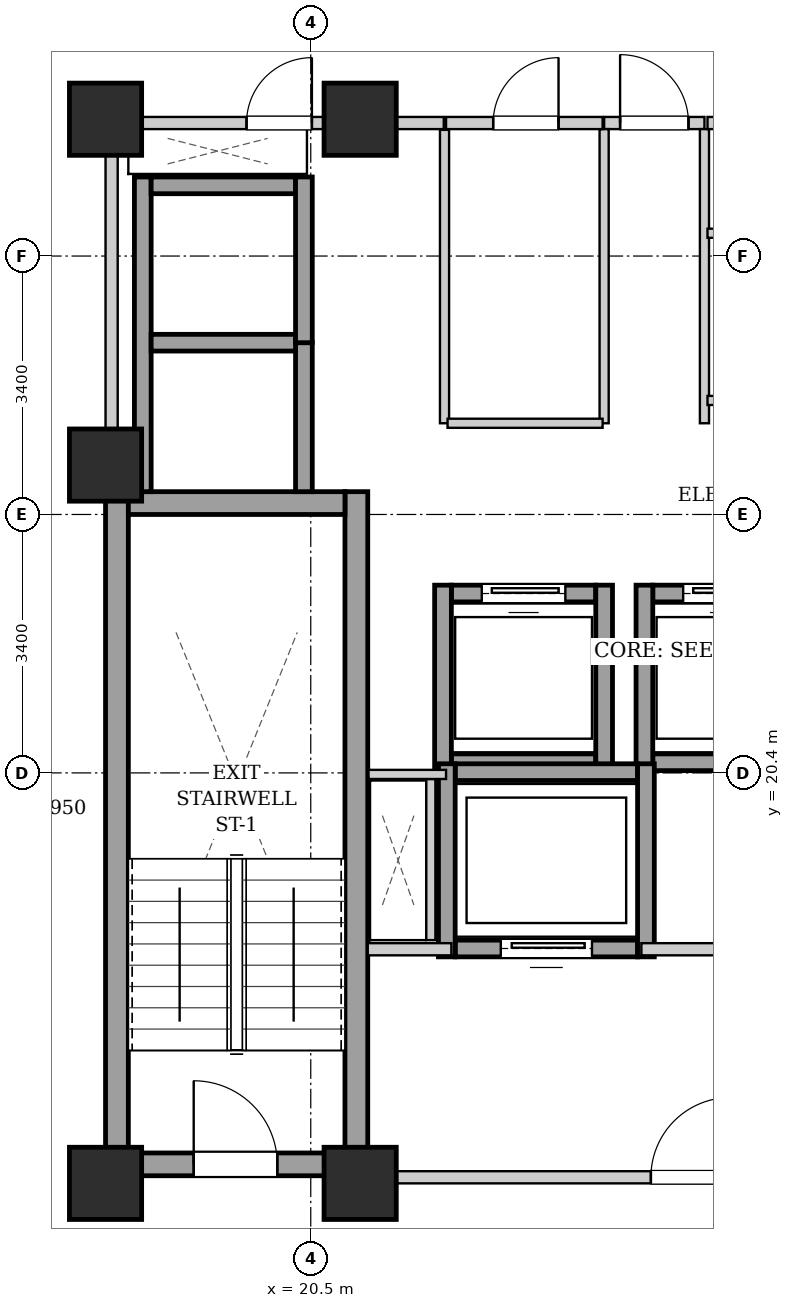
"""IFC4 building model, lengths in metres.
Left out: names, types, materials, properties, quantities, classifications, styles, units other than length and angle.
Written with IfcOpenShell. Run it as: python <this file> out.ifc"""

import sys

from ifc_helpers import new_model, si_unit, direction, frame, frame_2d, origin, origin_2d, place, context, subcontext, project, spatial, rectangle, extrude, element, fill, save


model = new_model("IFC4")
c1 = context("Model", 3, precision=1e-05, world=origin(), true_north=direction((0.0, 1.0)))
c2 = subcontext(c1, "Body", "Model", "MODEL_VIEW")
j1 = project(units=[si_unit("LENGTHUNIT", "METRE"), si_unit("PLANEANGLEUNIT", "RADIAN")], contexts=[c1])
p1 = place(None, origin())
s1 = spatial("IfcSite", under=j1, at=p1, CompositionType="ELEMENT")
p2 = place(p1, origin())
s2 = spatial("IfcBuilding", under=s1, at=p2, CompositionType="ELEMENT")
p3 = place(p2, frame((0.0, 0.0, 137.4)))
s3 = spatial("IfcBuildingStorey", under=s2, at=p3, CompositionType="ELEMENT", Elevation=137.4)
for number, where, z_axis, x_axis in (
    (1, (17.8, 15.0, 0.0), (0.0, 0.0, 1.0), (1.0, 0.0, 0.0)),
    (2, (21.15, 15.0, 0.0), (0.0, 0.0, 1.0), (1.0, 0.0, 0.0)),
    (3, (17.8, 29.0, 0.0), (0.0, 0.0, 1.0), (1.0, 0.0, 0.0)),
    (4, (21.15, 29.0, 0.0), (0.0, 0.0, 1.0), (1.0, 0.0, 0.0)),
    (5, (17.8, 24.45, 0.0), (0.0, 0.0, 1.0), (1.0, 0.0, 0.0)),
):
    element("IfcColumn", number, at=place(p3, frame(where, z_axis=z_axis, x_axis=x_axis)), inside=s3, PredefinedType="COLUMN", context=c2, shape_type="SweptSolid", body=[
        extrude(rectangle(XDim=0.95, YDim=0.95, at=origin_2d()), origin(), (0.0, 0.0, 1.0), 3.25),
    ])
for number, where, z_axis, x_axis in (
    (6, (17.95, 15.1, 0.0), (0.0, 0.0, 1.0), (0.0, 1.0, 0.0)),
    (7, (21.1, 15.1, 0.0), (0.0, 0.0, 1.0), (0.0, 1.0, 0.0)),
):
    element("IfcWall", number, at=place(p3, frame(where, z_axis=z_axis, x_axis=x_axis)), inside=s3, PredefinedType="SHEAR", context=c2, shape_type="SweptSolid", body=[
        extrude(rectangle(XDim=9.0, YDim=0.3, at=frame_2d((4.5, 0.0))), origin(), (0.0, 0.0, 1.0), 2.99),
    ])
p4 = place(p3, frame((18.1, 23.95, 0.0), z_axis=(0.0, 0.0, 1.0), x_axis=(1.0, 0.0, 0.0)))
e8 = element("IfcWall", 8, at=p4, inside=s3, PredefinedType="SHEAR", context=c2, shape_type="SweptSolid", body=[
    extrude(rectangle(XDim=2.85, YDim=0.3, at=frame_2d((1.425, 0.0))), origin(), (0.0, 0.0, 1.0), 2.99),
])
p5 = place(p3, frame((18.1, 15.25, 0.0), z_axis=(0.0, 0.0, 1.0), x_axis=(1.0, 0.0, 0.0)))
e9 = element("IfcWall", 9, at=p5, inside=s3, PredefinedType="SHEAR", context=c2, shape_type="SweptSolid", body=[
    extrude(rectangle(XDim=2.85, YDim=0.3, at=frame_2d((1.425, 0.0))), origin(), (0.0, 0.0, 1.0), 2.99),
])
p6 = place(p5, frame((0.86, 0.0, 0.0)))
e10 = element("IfcOpeningElement", 10, at=p6, cuts=e9, PredefinedType="OPENING", context=c2, shape_type="SweptSolid", body=[
    extrude(rectangle(XDim=1.1, YDim=2.05, at=frame_2d((0.55, 1.025))), frame((0.0, 0.16, 0.0), z_axis=(0.0, -1.0, 0.0), x_axis=(1.0, 0.0, 0.0)), (0.0, 0.0, 1.0), 0.32),
])
p7 = place(p3, frame((22.35, 20.54, 0.0), z_axis=(0.0, 0.0, 1.0), x_axis=(1.0, 0.0, 0.0)))
e11 = element("IfcWall", 11, at=p7, inside=s3, PredefinedType="SHEAR", context=c2, shape_type="SweptSolid", body=[
    extrude(rectangle(XDim=1.9, YDim=0.22, at=frame_2d((0.95, 0.0))), origin(), (0.0, 0.0, 1.0), 2.99),
])
p8 = place(p3, frame((22.35, 22.76, 0.0), z_axis=(0.0, 0.0, 1.0), x_axis=(1.0, 0.0, 0.0)))
e12 = element("IfcWall", 12, at=p8, inside=s3, PredefinedType="SHEAR", context=c2, shape_type="SweptSolid", body=[
    extrude(rectangle(XDim=1.9, YDim=0.22, at=frame_2d((0.95, 0.0))), origin(), (0.0, 0.0, 1.0), 2.99),
])
p9 = place(p8, frame((0.4, 0.0, 0.0)))
e13 = element("IfcOpeningElement", 13, at=p9, cuts=e12, PredefinedType="OPENING", context=c2, shape_type="SweptSolid", body=[
    extrude(rectangle(XDim=1.1, YDim=2.15, at=frame_2d((0.55, 1.075))), frame((0.0, 0.12, 0.0), z_axis=(0.0, -1.0, 0.0), x_axis=(1.0, 0.0, 0.0)), (0.0, 0.0, 1.0), 0.24),
])
for number, where, z_axis, x_axis in (
    (14, (22.24, 20.43, 0.0), (0.0, 0.0, 1.0), (0.0, 1.0, 0.0)),
    (15, (24.36, 20.43, 0.0), (0.0, 0.0, 1.0), (0.0, 1.0, 0.0)),
):
    element("IfcWall", number, at=place(p3, frame(where, z_axis=z_axis, x_axis=x_axis)), inside=s3, PredefinedType="SHEAR", context=c2, shape_type="SweptSolid", body=[
        extrude(rectangle(XDim=2.44, YDim=0.22, at=frame_2d((1.22, 0.0))), origin(), (0.0, 0.0, 1.0), 2.99),
    ])
p10 = place(p3, frame((25.0, 20.54, 0.0), z_axis=(0.0, 0.0, 1.0), x_axis=(1.0, 0.0, 0.0)))
e16 = element("IfcWall", 16, at=p10, inside=s3, PredefinedType="SHEAR", context=c2, shape_type="SweptSolid", body=[
    extrude(rectangle(XDim=1.9, YDim=0.22, at=frame_2d((0.95, 0.0))), origin(), (0.0, 0.0, 1.0), 2.99),
])
p11 = place(p3, frame((25.0, 22.76, 0.0), z_axis=(0.0, 0.0, 1.0), x_axis=(1.0, 0.0, 0.0)))
e17 = element("IfcWall", 17, at=p11, inside=s3, PredefinedType="SHEAR", context=c2, shape_type="SweptSolid", body=[
    extrude(rectangle(XDim=1.9, YDim=0.22, at=frame_2d((0.95, 0.0))), origin(), (0.0, 0.0, 1.0), 2.99),
])
p12 = place(p11, frame((0.4, 0.0, 0.0)))
e18 = element("IfcOpeningElement", 18, at=p12, cuts=e17, PredefinedType="OPENING", context=c2, shape_type="SweptSolid", body=[
    extrude(rectangle(XDim=1.1, YDim=2.15, at=frame_2d((0.55, 1.075))), frame((0.0, 0.12, 0.0), z_axis=(0.0, -1.0, 0.0), x_axis=(1.0, 0.0, 0.0)), (0.0, 0.0, 1.0), 0.24),
])
p13 = place(p3, frame((24.89, 20.43, 0.0), z_axis=(0.0, 0.0, 1.0), x_axis=(0.0, 1.0, 0.0)))
e19 = element("IfcWall", 19, at=p13, inside=s3, PredefinedType="SHEAR", context=c2, shape_type="SweptSolid", body=[
    extrude(rectangle(XDim=2.44, YDim=0.22, at=frame_2d((1.22, 0.0))), origin(), (0.0, 0.0, 1.0), 2.99),
])
p14 = place(p3, frame((18.29, 24.1, 0.0), z_axis=(0.0, 0.0, 1.0), x_axis=(0.0, 1.0, 0.0)))
e20 = element("IfcWall", 20, at=p14, inside=s3, PredefinedType="SHEAR", context=c2, shape_type="SweptSolid", body=[
    extrude(rectangle(XDim=4.14, YDim=0.22, at=frame_2d((2.07, 0.0))), origin(), (0.0, 0.0, 1.0), 2.99),
])
p15 = place(p3, frame((20.41, 24.1, 0.0), z_axis=(0.0, 0.0, 1.0), x_axis=(0.0, 1.0, 0.0)))
e21 = element("IfcWall", 21, at=p15, inside=s3, PredefinedType="SHEAR", context=c2, shape_type="SweptSolid", body=[
    extrude(rectangle(XDim=1.96, YDim=0.22, at=frame_2d((0.98, 0.0))), origin(), (0.0, 0.0, 1.0), 2.99),
])
for number, where, z_axis, x_axis in (
    (22, (18.4, 26.06, 0.0), (0.0, 0.0, 1.0), (1.0, 0.0, 0.0)),
    (23, (18.4, 28.13, 0.0), (0.0, 0.0, 1.0), (1.0, 0.0, 0.0)),
):
    element("IfcWall", number, at=place(p3, frame(where, z_axis=z_axis, x_axis=x_axis)), inside=s3, PredefinedType="SHEAR", context=c2, shape_type="SweptSolid", body=[
        extrude(rectangle(XDim=1.9, YDim=0.22, at=frame_2d((0.95, 0.0))), origin(), (0.0, 0.0, 1.0), 2.99),
    ])
p16 = place(p3, frame((20.41, 26.06, 0.0), z_axis=(0.0, 0.0, 1.0), x_axis=(0.0, 1.0, 0.0)))
e24 = element("IfcWall", 24, at=p16, inside=s3, PredefinedType="SHEAR", context=c2, shape_type="SweptSolid", body=[
    extrude(rectangle(XDim=2.18, YDim=0.22, at=frame_2d((1.09, 0.0))), origin(), (0.0, 0.0, 1.0), 2.99),
])
p17 = place(p3, frame((22.4, 18.09, 0.0), z_axis=(0.0, 0.0, 1.0), x_axis=(1.0, 0.0, 0.0)))
e25 = element("IfcWall", 25, at=p17, inside=s3, PredefinedType="SHEAR", context=c2, shape_type="SweptSolid", body=[
    extrude(rectangle(XDim=2.4, YDim=0.22, at=frame_2d((1.2, 0.0))), origin(), (0.0, 0.0, 1.0), 2.99),
])
p18 = place(p17, frame((0.6, 0.0, 0.0)))
e26 = element("IfcOpeningElement", 26, at=p18, cuts=e25, PredefinedType="OPENING", context=c2, shape_type="SweptSolid", body=[
    extrude(rectangle(XDim=1.2, YDim=2.15, at=frame_2d((0.6, 1.075))), frame((0.0, 0.12, 0.0), z_axis=(0.0, -1.0, 0.0), x_axis=(1.0, 0.0, 0.0)), (0.0, 0.0, 1.0), 0.24),
])
p19 = place(p3, frame((22.4, 20.41, 0.0), z_axis=(0.0, 0.0, 1.0), x_axis=(1.0, 0.0, 0.0)))
e27 = element("IfcWall", 27, at=p19, inside=s3, PredefinedType="SHEAR", context=c2, shape_type="SweptSolid", body=[
    extrude(rectangle(XDim=2.4, YDim=0.22, at=frame_2d((1.2, 0.0))), origin(), (0.0, 0.0, 1.0), 2.99),
])
for number, where, z_axis, x_axis in (
    (28, (22.29, 17.98, 0.0), (0.0, 0.0, 1.0), (0.0, 1.0, 0.0)),
    (29, (24.91, 17.98, 0.0), (0.0, 0.0, 1.0), (0.0, 1.0, 0.0)),
):
    element("IfcWall", number, at=place(p3, frame(where, z_axis=z_axis, x_axis=x_axis)), inside=s3, PredefinedType="SHEAR", context=c2, shape_type="SweptSolid", body=[
        extrude(rectangle(XDim=2.54, YDim=0.22, at=frame_2d((1.27, 0.0))), origin(), (0.0, 0.0, 1.0), 2.99),
    ])
p20 = place(p3, frame((21.25, 15.08, 0.0), z_axis=(0.0, 0.0, 1.0), x_axis=(1.0, 0.0, 0.0)))
e30 = element("IfcWall", 30, at=p20, inside=s3, PredefinedType="PARTITIONING", context=c2, shape_type="SweptSolid", body=[
    extrude(rectangle(XDim=8.5, YDim=0.16, at=frame_2d((4.25, 0.0))), origin(), (0.0, 0.0, 1.0), 2.426),
])
p21 = place(p20, frame((3.725, 0.0, 0.0)))
e31 = element("IfcOpeningElement", 31, at=p21, cuts=e30, PredefinedType="OPENING", context=c2, shape_type="SweptSolid", body=[
    extrude(rectangle(XDim=1.05, YDim=2.05, at=frame_2d((0.525, 1.025))), frame((0.0, 0.09, 0.0), z_axis=(0.0, -1.0, 0.0), x_axis=(1.0, 0.0, 0.0)), (0.0, 0.0, 1.0), 0.18),
])
p22 = place(p3, frame((21.25, 18.08, 0.0), z_axis=(0.0, 0.0, 1.0), x_axis=(1.0, 0.0, 0.0)))
e32 = element("IfcWall", 32, at=p22, inside=s3, PredefinedType="PARTITIONING", context=c2, shape_type="SweptSolid", body=[
    extrude(rectangle(XDim=1.1, YDim=0.16, at=frame_2d((0.55, 0.0))), origin(), (0.0, 0.0, 1.0), 2.99),
])
p23 = place(p3, frame((24.85, 18.08, 0.0), z_axis=(0.0, 0.0, 1.0), x_axis=(1.0, 0.0, 0.0)))
e33 = element("IfcWall", 33, at=p23, inside=s3, PredefinedType="PARTITIONING", context=c2, shape_type="SweptSolid", body=[
    extrude(rectangle(XDim=1.3, YDim=0.16, at=frame_2d((0.65, 0.0))), origin(), (0.0, 0.0, 1.0), 2.99),
])
p24 = place(p3, frame((17.88, 24.12, 0.0), z_axis=(0.0, 0.0, 1.0), x_axis=(0.0, 1.0, 0.0)))
e34 = element("IfcWall", 34, at=p24, inside=s3, PredefinedType="PARTITIONING", context=c2, shape_type="SweptSolid", body=[
    extrude(rectangle(XDim=4.76, YDim=0.16, at=frame_2d((2.38, 0.0))), origin(), (0.0, 0.0, 1.0), 2.325),
])
p25 = place(p3, frame((24.36, 28.95, 0.0), z_axis=(0.0, 0.0, 1.0), x_axis=(1.0, 0.0, 0.0)))
e35 = element("IfcWall", 35, at=p25, inside=s3, PredefinedType="PARTITIONING", context=c2, shape_type="SweptSolid", body=[
    extrude(rectangle(XDim=1.32, YDim=0.16, at=frame_2d((0.66, 0.0))), origin(), (0.0, 0.0, 1.0), 2.426),
])
p26 = place(p25, frame((0.21, 0.0, 0.0)))
e36 = element("IfcOpeningElement", 36, at=p26, cuts=e35, PredefinedType="OPENING", context=c2, shape_type="SweptSolid", body=[
    extrude(rectangle(XDim=0.9, YDim=2.05, at=frame_2d((0.45, 1.025))), frame((0.0, 0.09, 0.0), z_axis=(0.0, -1.0, 0.0), x_axis=(1.0, 0.0, 0.0)), (0.0, 0.0, 1.0), 0.18),
])
p27 = place(p3, frame((17.96, 28.95, 0.0), z_axis=(0.0, 0.0, 1.0), x_axis=(1.0, 0.0, 0.0)))
e37 = element("IfcWall", 37, at=p27, inside=s3, PredefinedType="PARTITIONING", context=c2, shape_type="SweptSolid", body=[
    extrude(rectangle(XDim=4.29, YDim=0.16, at=frame_2d((2.145, 0.0))), origin(), (0.0, 0.0, 1.0), 2.426),
])
p28 = place(p27, frame((1.695, 0.0, 0.0)))
e38 = element("IfcOpeningElement", 38, at=p28, cuts=e37, PredefinedType="OPENING", context=c2, shape_type="SweptSolid", body=[
    extrude(rectangle(XDim=0.86, YDim=2.05, at=frame_2d((0.43, 1.025))), frame((0.0, 0.09, 0.0), z_axis=(0.0, -1.0, 0.0), x_axis=(1.0, 0.0, 0.0)), (0.0, 0.0, 1.0), 0.18),
])
p29 = place(p3, frame((22.08, 18.2, 0.0), z_axis=(0.0, 0.0, 1.0), x_axis=(0.0, 1.0, 0.0)))
e39 = element("IfcWall", 39, at=p29, inside=s3, PredefinedType="PARTITIONING", context=c2, shape_type="SweptSolid", body=[
    extrude(rectangle(XDim=2.12, YDim=0.12, at=frame_2d((1.06, 0.0))), origin(), (0.0, 0.0, 1.0), 2.99),
])
p30 = place(p3, frame((22.28, 20.38, 0.0), z_axis=(0.0, 0.0, 1.0), x_axis=(-1.0, 0.0, 0.0)))
e40 = element("IfcWall", 40, at=p30, inside=s3, PredefinedType="PARTITIONING", context=c2, shape_type="SweptSolid", body=[
    extrude(rectangle(XDim=1.02, YDim=0.12, at=frame_2d((0.51, 0.0))), origin(), (0.0, 0.0, 1.0), 2.99),
])
for number, where, z_axis, x_axis in (
    (41, (24.36, 25.0, 0.0), (0.0, 0.0, 1.0), (0.0, 1.0, 0.0)),
    (42, (25.68, 25.0, 0.0), (0.0, 0.0, 1.0), (0.0, 1.0, 0.0)),
):
    element("IfcWall", number, at=place(p3, frame(where, z_axis=z_axis, x_axis=x_axis)), inside=s3, PredefinedType="PARTITIONING", context=c2, shape_type="SweptSolid", body=[
        extrude(rectangle(XDim=3.87, YDim=0.12, at=frame_2d((1.935, 0.0))), origin(), (0.0, 0.0, 1.0), 2.99),
    ])
p31 = place(p3, frame((22.26, 25.0, 0.0), z_axis=(0.0, 0.0, 1.0), x_axis=(0.0, 1.0, 0.0)))
e43 = element("IfcWall", 43, at=p31, inside=s3, PredefinedType="PARTITIONING", context=c2, shape_type="SweptSolid", body=[
    extrude(rectangle(XDim=3.86, YDim=0.12, at=frame_2d((1.93, 0.0))), origin(), (0.0, 0.0, 1.0), 2.99),
])
p32 = place(p3, frame((22.3, 25.0, 0.0), z_axis=(0.0, 0.0, 1.0), x_axis=(1.0, 0.0, 0.0)))
e44 = element("IfcWall", 44, at=p32, inside=s3, PredefinedType="PARTITIONING", context=c2, shape_type="SweptSolid", body=[
    extrude(rectangle(XDim=2.04, YDim=0.12, at=frame_2d((1.02, 0.0))), origin(), (0.0, 0.0, 1.0), 2.99),
])
p33 = place(p3, frame((22.28, 28.95, 0.0), z_axis=(0.0, 0.0, 1.0), x_axis=(1.0, 0.0, 0.0)))
e45 = element("IfcWall", 45, at=p33, inside=s3, PredefinedType="PARTITIONING", context=c2, shape_type="SweptSolid", body=[
    extrude(rectangle(XDim=2.06, YDim=0.16, at=frame_2d((1.03, 0.0))), origin(), (0.0, 0.0, 1.0), 2.426),
])
p34 = place(p33, frame((0.62, 0.0, 0.0)))
e46 = element("IfcOpeningElement", 46, at=p34, cuts=e45, PredefinedType="OPENING", context=c2, shape_type="SweptSolid", body=[
    extrude(rectangle(XDim=0.86, YDim=2.05, at=frame_2d((0.43, 1.025))), frame((0.0, 0.09, 0.0), z_axis=(0.0, -1.0, 0.0), x_axis=(1.0, 0.0, 0.0)), (0.0, 0.0, 1.0), 0.18),
])
p35 = place(p3, frame((25.72, 27.5, 0.0), z_axis=(0.0, 0.0, 1.0), x_axis=(1.0, 0.0, 0.0)))
e47 = element("IfcWall", 47, at=p35, inside=s3, PredefinedType="PARTITIONING", context=c2, shape_type="SweptSolid", body=[
    extrude(rectangle(XDim=4.36, YDim=0.12, at=frame_2d((2.18, 0.0))), origin(), (0.0, 0.0, 1.0), 2.99),
])
p36 = place(p3, frame((25.72, 25.3, 0.0), z_axis=(0.0, 0.0, 1.0), x_axis=(1.0, 0.0, 0.0)))
e48 = element("IfcWall", 48, at=p36, inside=s3, PredefinedType="PARTITIONING", context=c2, shape_type="SweptSolid", body=[
    extrude(rectangle(XDim=4.32, YDim=0.12, at=frame_2d((2.16, 0.0))), origin(), (0.0, 0.0, 1.0), 2.99),
])
p37 = place(p36, frame((1.65, 0.0, 0.0)))
e49 = element("IfcOpeningElement", 49, at=p37, cuts=e48, PredefinedType="OPENING", context=c2, shape_type="SweptSolid", body=[
    extrude(rectangle(XDim=0.9, YDim=2.05, at=frame_2d((0.45, 1.025))), frame((0.0, 0.07, 0.0), z_axis=(0.0, -1.0, 0.0), x_axis=(1.0, 0.0, 0.0)), (0.0, 0.0, 1.0), 0.14),
])
p38 = place(p3, frame((25.72, 28.95, 0.0), z_axis=(0.0, 0.0, 1.0), x_axis=(1.0, 0.0, 0.0)))
e50 = element("IfcWall", 50, at=p38, inside=s3, PredefinedType="PARTITIONING", context=c2, shape_type="SweptSolid", body=[
    extrude(rectangle(XDim=7.32, YDim=0.16, at=frame_2d((3.66, 0.0))), origin(), (0.0, 0.0, 1.0), 2.426),
])
p39 = place(p38, frame((1.27, 0.0, 0.0)))
e51 = element("IfcOpeningElement", 51, at=p39, cuts=e50, PredefinedType="OPENING", context=c2, shape_type="SweptSolid", body=[
    extrude(rectangle(XDim=0.86, YDim=2.05, at=frame_2d((0.43, 1.025))), frame((0.0, 0.09, 0.0), z_axis=(0.0, -1.0, 0.0), x_axis=(1.0, 0.0, 0.0)), (0.0, 0.0, 1.0), 0.18),
])
p40 = place(p6, origin())
e52 = element("IfcDoor", 52, at=p40, inside=s3, OperationType="SINGLE_SWING_LEFT", PredefinedType="DOOR", context=c2, shape_type="SweptSolid", body=[
    extrude(rectangle(XDim=1.1, YDim=2.05, at=frame_2d((0.55, 1.025))), frame((0.0, 0.025, 0.0), z_axis=(0.0, -1.0, 0.0), x_axis=(1.0, 0.0, 0.0)), (0.0, 0.0, 1.0), 0.05),
])
fill(e10, e52)
p41 = place(p9, origin())
e53 = element("IfcDoor", 53, at=p41, inside=s3, OperationType="SLIDING_TO_LEFT", PredefinedType="DOOR", context=c2, shape_type="SweptSolid", body=[
    extrude(rectangle(XDim=1.1, YDim=2.15, at=frame_2d((0.55, 1.075))), frame((0.0, 0.025, 0.0), z_axis=(0.0, -1.0, 0.0), x_axis=(1.0, 0.0, 0.0)), (0.0, 0.0, 1.0), 0.05),
])
fill(e13, e53)
p42 = place(p12, origin())
e54 = element("IfcDoor", 54, at=p42, inside=s3, OperationType="SLIDING_TO_LEFT", PredefinedType="DOOR", context=c2, shape_type="SweptSolid", body=[
    extrude(rectangle(XDim=1.1, YDim=2.15, at=frame_2d((0.55, 1.075))), frame((0.0, 0.025, 0.0), z_axis=(0.0, -1.0, 0.0), x_axis=(1.0, 0.0, 0.0)), (0.0, 0.0, 1.0), 0.05),
])
fill(e18, e54)
p43 = place(p18, origin())
e55 = element("IfcDoor", 55, at=p43, inside=s3, OperationType="SLIDING_TO_LEFT", PredefinedType="DOOR", context=c2, shape_type="SweptSolid", body=[
    extrude(rectangle(XDim=1.2, YDim=2.15, at=frame_2d((0.6, 1.075))), frame((0.0, 0.025, 0.0), z_axis=(0.0, -1.0, 0.0), x_axis=(1.0, 0.0, 0.0)), (0.0, 0.0, 1.0), 0.05),
])
fill(e26, e55)
p44 = place(p21, origin())
e56 = element("IfcDoor", 56, at=p44, inside=s3, OperationType="SINGLE_SWING_RIGHT", PredefinedType="DOOR", context=c2, shape_type="SweptSolid", body=[
    extrude(rectangle(XDim=1.05, YDim=2.05, at=frame_2d((0.525, 1.025))), frame((0.0, 0.025, 0.0), z_axis=(0.0, -1.0, 0.0), x_axis=(1.0, 0.0, 0.0)), (0.0, 0.0, 1.0), 0.05),
])
fill(e31, e56)
p45 = place(p26, origin())
e57 = element("IfcDoor", 57, at=p45, inside=s3, OperationType="SINGLE_SWING_LEFT", PredefinedType="DOOR", context=c2, shape_type="SweptSolid", body=[
    extrude(rectangle(XDim=0.9, YDim=2.05, at=frame_2d((0.45, 1.025))), frame((0.0, 0.025, 0.0), z_axis=(0.0, -1.0, 0.0), x_axis=(1.0, 0.0, 0.0)), (0.0, 0.0, 1.0), 0.05),
])
fill(e36, e57)
p46 = place(p28, origin())
e58 = element("IfcDoor", 58, at=p46, inside=s3, OperationType="SINGLE_SWING_RIGHT", PredefinedType="DOOR", context=c2, shape_type="SweptSolid", body=[
    extrude(rectangle(XDim=0.86, YDim=2.05, at=frame_2d((0.43, 1.025))), frame((0.0, 0.025, 0.0), z_axis=(0.0, -1.0, 0.0), x_axis=(1.0, 0.0, 0.0)), (0.0, 0.0, 1.0), 0.05),
])
fill(e38, e58)
p47 = place(p34, origin())
e59 = element("IfcDoor", 59, at=p47, inside=s3, OperationType="SINGLE_SWING_RIGHT", PredefinedType="DOOR", context=c2, shape_type="SweptSolid", body=[
    extrude(rectangle(XDim=0.86, YDim=2.05, at=frame_2d((0.43, 1.025))), frame((0.0, 0.025, 0.0), z_axis=(0.0, -1.0, 0.0), x_axis=(1.0, 0.0, 0.0)), (0.0, 0.0, 1.0), 0.05),
])
fill(e46, e59)
save(model, sys.argv[1])
